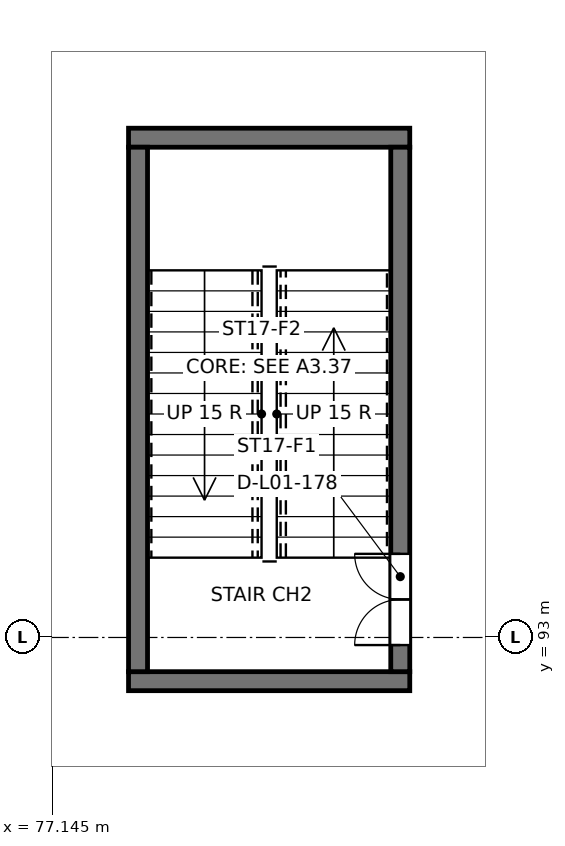
"""IFC4 building model, lengths in metres.
Left out: names, types, materials, properties, quantities, classifications, styles, units other than length and angle.
Written with IfcOpenShell. Run it as: python <this file> out.ifc"""

import sys

from ifc_helpers import new_model, si_unit, direction, frame, frame_2d, origin, place, context, subcontext, project, spatial, rectangle, extrude, element, fill, save


model = new_model("IFC4")
c1 = context("Model", 3, precision=1e-05, world=origin(), true_north=direction((0.0, 1.0)))
c2 = subcontext(c1, "Body", "Model", "MODEL_VIEW")
j1 = project(units=[si_unit("LENGTHUNIT", "METRE"), si_unit("PLANEANGLEUNIT", "RADIAN")], contexts=[c1])
p1 = place(None, origin())
s1 = spatial("IfcSite", under=j1, at=p1, CompositionType="ELEMENT")
p2 = place(p1, origin())
s2 = spatial("IfcBuilding", under=s1, at=p2, CompositionType="ELEMENT")
p3 = place(p2, frame((0.0, 0.0, 4.8)))
s3 = spatial("IfcBuildingStorey", under=s2, at=p3, CompositionType="ELEMENT", Elevation=4.8)
for number, where, z_axis, x_axis in (
    (1, (78.15, 92.425, 0.0), (0.0, 0.0, 1.0), (1.0, 0.0, 0.0)),
    (2, (78.15, 99.575, 0.0), (0.0, 0.0, 1.0), (1.0, 0.0, 0.0)),
):
    element("IfcWall", number, at=place(p3, frame(where, z_axis=z_axis, x_axis=x_axis)), inside=s3, PredefinedType="SOLIDWALL", context=c2, shape_type="SweptSolid", body=[
        extrude(rectangle(XDim=3.7, YDim=0.25, at=frame_2d((1.85, 0.0))), origin(), (0.0, 0.0, 1.0), 4.8),
    ])
p4 = place(p3, frame((78.275, 92.55, 0.0), z_axis=(0.0, 0.0, 1.0), x_axis=(0.0, 1.0, 0.0)))
e3 = element("IfcWall", 3, at=p4, inside=s3, PredefinedType="SOLIDWALL", context=c2, shape_type="SweptSolid", body=[
    extrude(rectangle(XDim=6.9, YDim=0.25, at=frame_2d((3.45, 0.0))), origin(), (0.0, 0.0, 1.0), 4.8),
])
p5 = place(p3, frame((81.725, 92.55, 0.0), z_axis=(0.0, 0.0, 1.0), x_axis=(0.0, 1.0, 0.0)))
e4 = element("IfcWall", 4, at=p5, inside=s3, PredefinedType="SOLIDWALL", context=c2, shape_type="SweptSolid", body=[
    extrude(rectangle(XDim=6.9, YDim=0.25, at=frame_2d((3.45, 0.0))), origin(), (0.0, 0.0, 1.0), 4.8),
])
p6 = place(p5, frame((0.35, 0.0, 0.0)))
e5 = element("IfcOpeningElement", 5, at=p6, cuts=e4, PredefinedType="OPENING", context=c2, shape_type="SweptSolid", body=[
    extrude(rectangle(XDim=1.2, YDim=2.1, at=frame_2d((0.6, 1.05))), frame((0.0, 0.135, 0.0), z_axis=(0.0, -1.0, 0.0), x_axis=(1.0, 0.0, 0.0)), (0.0, 0.0, 1.0), 0.27),
])
p7 = place(p6, origin())
e6 = element("IfcDoor", 6, at=p7, inside=s3, OperationType="DOUBLE_DOOR_SINGLE_SWING", PredefinedType="DOOR", context=c2, shape_type="SweptSolid", body=[
    extrude(rectangle(XDim=1.2, YDim=2.1, at=frame_2d((0.6, 1.05))), frame((0.0, 0.025, 0.0), z_axis=(0.0, -1.0, 0.0), x_axis=(1.0, 0.0, 0.0)), (0.0, 0.0, 1.0), 0.05),
])
fill(e5, e6)
save(model, sys.argv[1])
